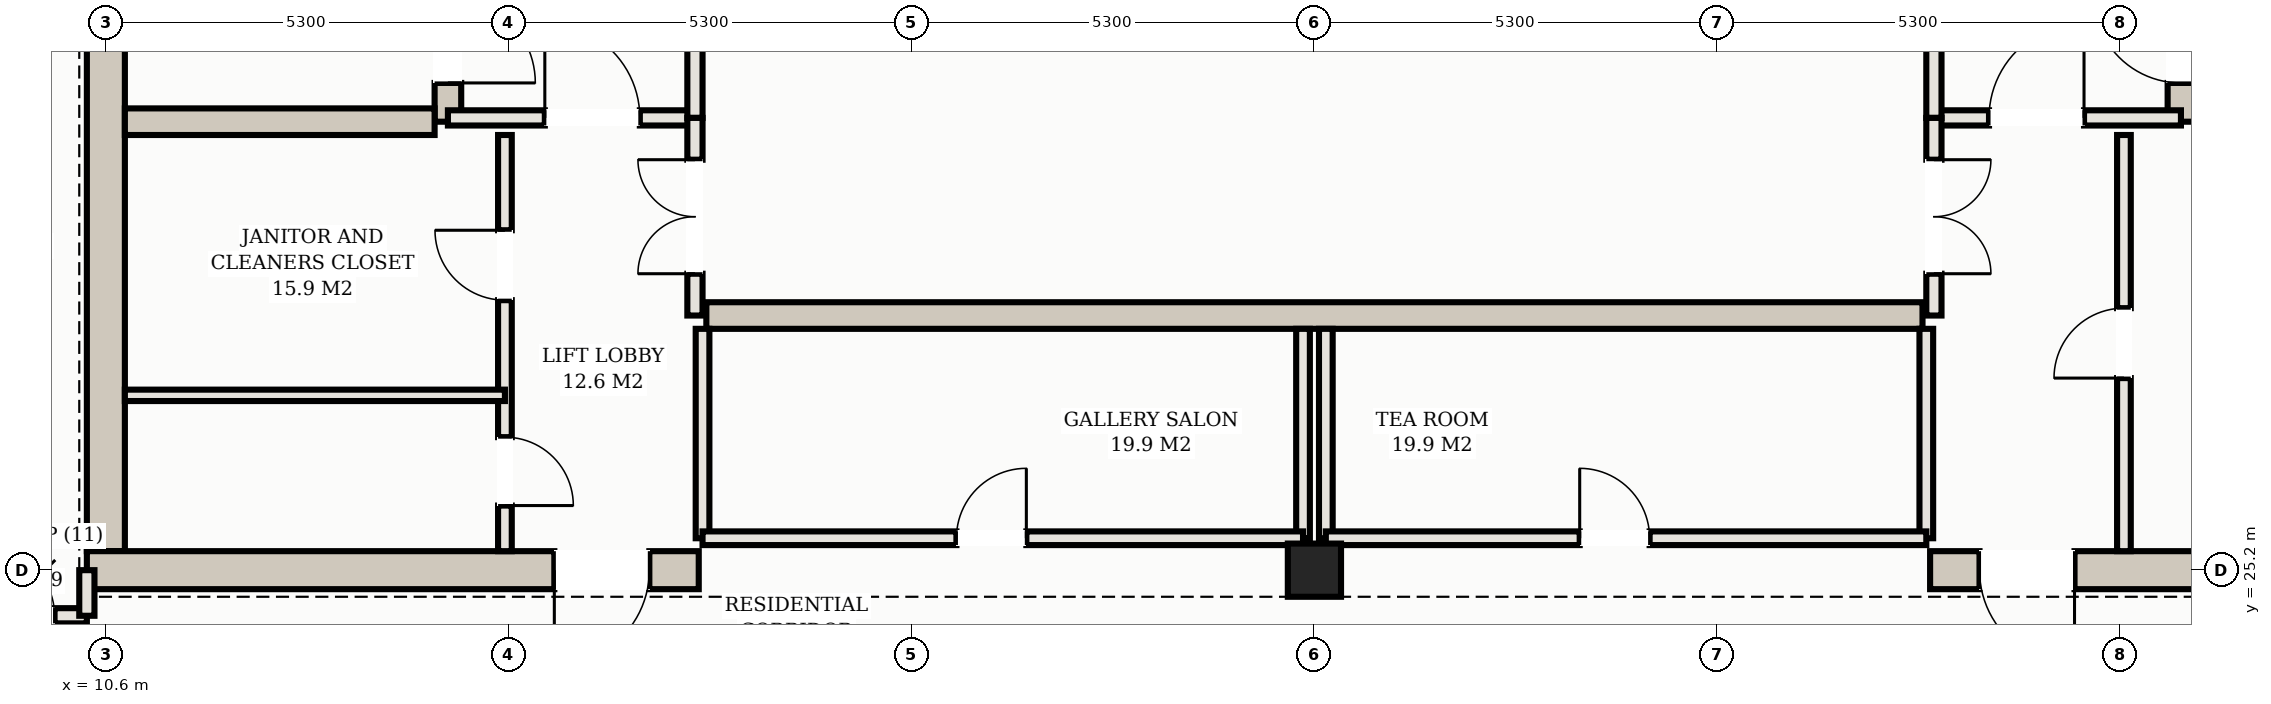
"""IFC4 building model, lengths in metres.
Left out: names, types, materials, properties, quantities, classifications, styles, units other than length and angle.
Written with IfcOpenShell. Run it as: python <this file> out.ifc"""

import sys

from ifc_helpers import new_model, si_unit, direction, frame, frame_2d, origin, origin_2d, place, context, subcontext, project, spatial, rectangle, hollow_rectangle, extrude, element, fill, save


model = new_model("IFC4")
c1 = context("Model", 3, precision=1e-05, world=origin(), true_north=direction((0.0, 1.0)))
c2 = subcontext(c1, "Body", "Model", "MODEL_VIEW")
j1 = project(units=[si_unit("LENGTHUNIT", "METRE"), si_unit("PLANEANGLEUNIT", "RADIAN")], contexts=[c1])
p1 = place(None, origin())
s1 = spatial("IfcSite", under=j1, at=p1, CompositionType="ELEMENT")
p2 = place(p1, origin())
s2 = spatial("IfcBuilding", under=s1, at=p2, CompositionType="ELEMENT")
p3 = place(p2, frame((0.0, 0.0, 246.2)))
s3 = spatial("IfcBuildingStorey", under=s2, at=p3, CompositionType="ELEMENT", Elevation=246.2)
p4 = place(p3, frame((10.6, 25.45, 0.0), z_axis=(0.0, 0.0, 1.0), x_axis=(0.0, 1.0, 0.0)))
e1 = element("IfcWall", 1, at=p4, inside=s3, PredefinedType="SHEAR", context=c2, shape_type="SweptSolid", body=[
    extrude(rectangle(XDim=14.3, YDim=0.5, at=frame_2d((7.15, 0.0))), origin(), (0.0, 0.0, 1.0), 3.11),
])
p5 = place(p3, frame((10.35, 25.2, 0.0), z_axis=(0.0, 0.0, 1.0), x_axis=(1.0, 0.0, 0.0)))
e2 = element("IfcWall", 2, at=p5, inside=s3, PredefinedType="SHEAR", context=c2, shape_type="SweptSolid", body=[
    extrude(rectangle(XDim=8.05, YDim=0.5, at=frame_2d((4.025, 0.0))), origin(), (0.0, 0.0, 1.0), 3.11),
])
p6 = place(p5, frame((6.15, 0.0, 0.0)))
e3 = element("IfcOpeningElement", 3, at=p6, cuts=e2, PredefinedType="OPENING", context=c2, shape_type="SweptSolid", body=[
    extrude(rectangle(XDim=1.25, YDim=2.2, at=frame_2d((0.625, 1.1))), frame((0.0, 0.26, 0.0), z_axis=(0.0, -1.0, 0.0), x_axis=(1.0, 0.0, 0.0)), (0.0, 0.0, 1.0), 0.52),
])
p7 = place(p3, frame((34.6, 25.2, 0.0), z_axis=(0.0, 0.0, 1.0), x_axis=(1.0, 0.0, 0.0)))
e4 = element("IfcWall", 4, at=p7, inside=s3, PredefinedType="SHEAR", context=c2, shape_type="SweptSolid", body=[
    extrude(rectangle(XDim=8.05, YDim=0.5, at=frame_2d((4.025, 0.0))), origin(), (0.0, 0.0, 1.0), 3.11),
])
p8 = place(p7, frame((0.65, 0.0, 0.0)))
e5 = element("IfcOpeningElement", 5, at=p8, cuts=e4, PredefinedType="OPENING", context=c2, shape_type="SweptSolid", body=[
    extrude(rectangle(XDim=1.25, YDim=2.2, at=frame_2d((0.625, 1.1))), frame((0.0, 0.26, 0.0), z_axis=(0.0, -1.0, 0.0), x_axis=(1.0, 0.0, 0.0)), (0.0, 0.0, 1.0), 0.52),
])
p9 = place(p3, frame((15.1, 31.1, 0.0), z_axis=(0.0, 0.0, 1.0), x_axis=(0.0, 1.0, 0.0)))
e6 = element("IfcWall", 6, at=p9, inside=s3, PredefinedType="SHEAR", context=c2, shape_type="SweptSolid", body=[
    extrude(rectangle(XDim=8.65, YDim=0.35, at=frame_2d((4.325, 0.0))), origin(), (0.0, 0.0, 1.0), 3.11),
])
p10 = place(p9, frame((0.51, 0.0, 0.0)))
e7 = element("IfcOpeningElement", 7, at=p10, cuts=e6, PredefinedType="OPENING", context=c2, shape_type="SweptSolid", body=[
    extrude(rectangle(XDim=1.15, YDim=2.2, at=frame_2d((0.575, 1.1))), frame((0.0, 0.185, 0.0), z_axis=(0.0, -1.0, 0.0), x_axis=(1.0, 0.0, 0.0)), (0.0, 0.0, 1.0), 0.37),
])
p11 = place(p3, frame((10.85, 31.1, 0.0), z_axis=(0.0, 0.0, 1.0), x_axis=(1.0, 0.0, 0.0)))
e8 = element("IfcWall", 8, at=p11, inside=s3, PredefinedType="SHEAR", context=c2, shape_type="SweptSolid", body=[
    extrude(rectangle(XDim=4.075, YDim=0.35, at=frame_2d((2.038, 0.0))), origin(), (0.0, 0.0, 1.0), 3.11),
])
p12 = place(p3, frame((37.9, 31.1, 0.0), z_axis=(0.0, 0.0, 1.0), x_axis=(0.0, 1.0, 0.0)))
e9 = element("IfcWall", 9, at=p12, inside=s3, PredefinedType="SHEAR", context=c2, shape_type="SweptSolid", body=[
    extrude(rectangle(XDim=8.65, YDim=0.35, at=frame_2d((4.325, 0.0))), origin(), (0.0, 0.0, 1.0), 3.11),
])
p13 = place(p12, frame((0.51, 0.0, 0.0)))
e10 = element("IfcOpeningElement", 10, at=p13, cuts=e9, PredefinedType="OPENING", context=c2, shape_type="SweptSolid", body=[
    extrude(rectangle(XDim=1.15, YDim=2.2, at=frame_2d((0.575, 1.1))), frame((0.0, 0.185, 0.0), z_axis=(0.0, -1.0, 0.0), x_axis=(1.0, 0.0, 0.0)), (0.0, 0.0, 1.0), 0.37),
])
p14 = place(p3, frame((18.5, 28.55, 0.0), z_axis=(0.0, 0.0, 1.0), x_axis=(1.0, 0.0, 0.0)))
e11 = element("IfcWall", 11, at=p14, inside=s3, PredefinedType="SHEAR", context=c2, shape_type="SweptSolid", body=[
    extrude(rectangle(XDim=16.0, YDim=0.35, at=frame_2d((8.0, 0.0))), origin(), (0.0, 0.0, 1.0), 3.11),
])
p15 = place(p3, frame((26.5, 25.2, 0.0), z_axis=(0.0, 0.0, 1.0), x_axis=(1.0, 0.0, 0.0)))
e12 = element("IfcColumn", 12, at=p15, inside=s3, PredefinedType="COLUMN", context=c2, shape_type="SweptSolid", body=[
    extrude(hollow_rectangle(XDim=0.7, YDim=0.7, WallThickness=0.025, at=origin_2d()), origin(), (0.0, 0.0, 1.0), 3.3),
])
p16 = place(p3, frame((15.1, 31.15, 0.0), z_axis=(0.0, 0.0, 1.0), x_axis=(1.0, 0.0, 0.0)))
e13 = element("IfcWall", 13, at=p16, inside=s3, PredefinedType="PARTITIONING", context=c2, shape_type="SweptSolid", body=[
    extrude(rectangle(XDim=3.25, YDim=0.2, at=frame_2d((1.625, 0.0))), origin(), (0.0, 0.0, 1.0), 2.45),
])
p17 = place(p16, frame((1.275, 0.0, 0.0)))
e14 = element("IfcOpeningElement", 14, at=p17, cuts=e13, PredefinedType="OPENING", context=c2, shape_type="SweptSolid", body=[
    extrude(rectangle(XDim=1.25, YDim=2.2, at=frame_2d((0.625, 1.1))), frame((0.0, 0.11, 0.0), z_axis=(0.0, -1.0, 0.0), x_axis=(1.0, 0.0, 0.0)), (0.0, 0.0, 1.0), 0.22),
])
p18 = place(p3, frame((18.35, 31.15, 0.0), z_axis=(0.0, 0.0, 1.0), x_axis=(0.0, 1.0, 0.0)))
e15 = element("IfcWall", 15, at=p18, inside=s3, PredefinedType="PARTITIONING", context=c2, shape_type="SweptSolid", body=[
    extrude(rectangle(XDim=5.15, YDim=0.2, at=frame_2d((2.575, 0.0))), origin(), (0.0, 0.0, 1.0), 2.45),
])
p19 = place(p18, frame((1.875, 0.0, 0.0)))
e16 = element("IfcOpeningElement", 16, at=p19, cuts=e15, PredefinedType="OPENING", context=c2, shape_type="SweptSolid", body=[
    extrude(rectangle(XDim=1.25, YDim=2.2, at=frame_2d((0.625, 1.1))), frame((0.0, 0.11, 0.0), z_axis=(0.0, -1.0, 0.0), x_axis=(1.0, 0.0, 0.0)), (0.0, 0.0, 1.0), 0.22),
])
p20 = place(p3, frame((34.65, 31.15, 0.0), z_axis=(0.0, 0.0, 1.0), x_axis=(1.0, 0.0, 0.0)))
e17 = element("IfcWall", 17, at=p20, inside=s3, PredefinedType="PARTITIONING", context=c2, shape_type="SweptSolid", body=[
    extrude(rectangle(XDim=3.25, YDim=0.2, at=frame_2d((1.625, 0.0))), origin(), (0.0, 0.0, 1.0), 2.45),
])
p21 = place(p20, frame((0.725, 0.0, 0.0)))
e18 = element("IfcOpeningElement", 18, at=p21, cuts=e17, PredefinedType="OPENING", context=c2, shape_type="SweptSolid", body=[
    extrude(rectangle(XDim=1.25, YDim=2.2, at=frame_2d((0.625, 1.1))), frame((0.0, 0.11, 0.0), z_axis=(0.0, -1.0, 0.0), x_axis=(1.0, 0.0, 0.0)), (0.0, 0.0, 1.0), 0.22),
])
p22 = place(p3, frame((34.65, 31.15, 0.0), z_axis=(0.0, 0.0, 1.0), x_axis=(0.0, 1.0, 0.0)))
e19 = element("IfcWall", 19, at=p22, inside=s3, PredefinedType="PARTITIONING", context=c2, shape_type="SweptSolid", body=[
    extrude(rectangle(XDim=5.15, YDim=0.2, at=frame_2d((2.575, 0.0))), origin(), (0.0, 0.0, 1.0), 2.45),
])
p23 = place(p22, frame((1.875, 0.0, 0.0)))
e20 = element("IfcOpeningElement", 20, at=p23, cuts=e19, PredefinedType="OPENING", context=c2, shape_type="SweptSolid", body=[
    extrude(rectangle(XDim=1.25, YDim=2.2, at=frame_2d((0.625, 1.1))), frame((0.0, 0.11, 0.0), z_axis=(0.0, -1.0, 0.0), x_axis=(1.0, 0.0, 0.0)), (0.0, 0.0, 1.0), 0.22),
])
p24 = place(p3, frame((15.85, 25.45, 0.0), z_axis=(0.0, 0.0, 1.0), x_axis=(0.0, 1.0, 0.0)))
e21 = element("IfcWall", 21, at=p24, inside=s3, PredefinedType="PARTITIONING", context=c2, shape_type="SweptSolid", body=[
    extrude(rectangle(XDim=5.475, YDim=0.18, at=frame_2d((2.738, 0.0))), origin(), (0.0, 0.0, 1.0), 2.45),
])
p25 = place(p24, frame((0.6, 0.0, 0.0)))
e22 = element("IfcOpeningElement", 22, at=p25, cuts=e21, PredefinedType="OPENING", context=c2, shape_type="SweptSolid", body=[
    extrude(rectangle(XDim=0.9, YDim=2.15, at=frame_2d((0.45, 1.075))), frame((0.0, 0.1, 0.0), z_axis=(0.0, -1.0, 0.0), x_axis=(1.0, 0.0, 0.0)), (0.0, 0.0, 1.0), 0.2),
])
p26 = place(p24, frame((3.302, 0.0, 0.0)))
e23 = element("IfcOpeningElement", 23, at=p26, cuts=e21, PredefinedType="OPENING", context=c2, shape_type="SweptSolid", body=[
    extrude(rectangle(XDim=0.92, YDim=2.15, at=frame_2d((0.46, 1.075))), frame((0.0, 0.1, 0.0), z_axis=(0.0, -1.0, 0.0), x_axis=(1.0, 0.0, 0.0)), (0.0, 0.0, 1.0), 0.2),
])
p27 = place(p3, frame((37.15, 25.45, 0.0), z_axis=(0.0, 0.0, 1.0), x_axis=(0.0, 1.0, 0.0)))
e24 = element("IfcWall", 24, at=p27, inside=s3, PredefinedType="PARTITIONING", context=c2, shape_type="SweptSolid", body=[
    extrude(rectangle(XDim=5.475, YDim=0.18, at=frame_2d((2.738, 0.0))), origin(), (0.0, 0.0, 1.0), 2.45),
])
p28 = place(p27, frame((2.277, 0.0, 0.0)))
e25 = element("IfcOpeningElement", 25, at=p28, cuts=e24, PredefinedType="OPENING", context=c2, shape_type="SweptSolid", body=[
    extrude(rectangle(XDim=0.92, YDim=2.15, at=frame_2d((0.46, 1.075))), frame((0.0, 0.1, 0.0), z_axis=(0.0, -1.0, 0.0), x_axis=(1.0, 0.0, 0.0)), (0.0, 0.0, 1.0), 0.2),
])
p29 = place(p3, frame((10.85, 27.5, 0.0), z_axis=(0.0, 0.0, 1.0), x_axis=(1.0, 0.0, 0.0)))
e26 = element("IfcWall", 26, at=p29, inside=s3, PredefinedType="PARTITIONING", context=c2, shape_type="SweptSolid", body=[
    extrude(rectangle(XDim=5.0, YDim=0.15, at=frame_2d((2.5, 0.0))), origin(), (0.0, 0.0, 1.0), 2.45),
])
p30 = place(p3, frame((18.35, 28.55, 0.0), z_axis=(0.0, 0.0, 1.0), x_axis=(0.0, 1.0, 0.0)))
e27 = element("IfcWall", 27, at=p30, inside=s3, PredefinedType="PARTITIONING", context=c2, shape_type="SweptSolid", body=[
    extrude(rectangle(XDim=2.6, YDim=0.2, at=frame_2d((1.3, 0.0))), origin(), (0.0, 0.0, 1.0), 2.45),
])
p31 = place(p30, frame((0.55, 0.0, 0.0)))
e28 = element("IfcOpeningElement", 28, at=p31, cuts=e27, PredefinedType="OPENING", context=c2, shape_type="SweptSolid", body=[
    extrude(rectangle(XDim=1.5, YDim=2.25, at=frame_2d((0.75, 1.125))), frame((0.0, 0.11, 0.0), z_axis=(0.0, -1.0, 0.0), x_axis=(1.0, 0.0, 0.0)), (0.0, 0.0, 1.0), 0.22),
])
p32 = place(p3, frame((34.65, 28.55, 0.0), z_axis=(0.0, 0.0, 1.0), x_axis=(0.0, 1.0, 0.0)))
e29 = element("IfcWall", 29, at=p32, inside=s3, PredefinedType="PARTITIONING", context=c2, shape_type="SweptSolid", body=[
    extrude(rectangle(XDim=2.6, YDim=0.2, at=frame_2d((1.3, 0.0))), origin(), (0.0, 0.0, 1.0), 2.45),
])
p33 = place(p32, frame((0.55, 0.0, 0.0)))
e30 = element("IfcOpeningElement", 30, at=p33, cuts=e29, PredefinedType="OPENING", context=c2, shape_type="SweptSolid", body=[
    extrude(rectangle(XDim=1.5, YDim=2.25, at=frame_2d((0.75, 1.125))), frame((0.0, 0.11, 0.0), z_axis=(0.0, -1.0, 0.0), x_axis=(1.0, 0.0, 0.0)), (0.0, 0.0, 1.0), 0.22),
])
for number, where, z_axis, x_axis in (
    (31, (18.45, 25.62, 0.0), (0.0, 0.0, 1.0), (0.0, 1.0, 0.0)),
    (32, (26.35, 25.62, 0.0), (0.0, 0.0, 1.0), (0.0, 1.0, 0.0)),
):
    element("IfcWall", number, at=place(p3, frame(where, z_axis=z_axis, x_axis=x_axis)), inside=s3, PredefinedType="PARTITIONING", context=c2, shape_type="SweptSolid", body=[
        extrude(rectangle(XDim=2.755, YDim=0.18, at=frame_2d((1.377, 0.0))), origin(), (0.0, 0.0, 1.0), 2.45),
    ])
p34 = place(p3, frame((18.45, 25.62, 0.0), z_axis=(0.0, 0.0, 1.0), x_axis=(1.0, 0.0, 0.0)))
e33 = element("IfcWall", 33, at=p34, inside=s3, PredefinedType="PARTITIONING", context=c2, shape_type="SweptSolid", body=[
    extrude(rectangle(XDim=7.9, YDim=0.18, at=frame_2d((3.95, 0.0))), origin(), (0.0, 0.0, 1.0), 2.45),
])
p35 = place(p34, frame((3.34, 0.0, 0.0)))
e34 = element("IfcOpeningElement", 34, at=p35, cuts=e33, PredefinedType="OPENING", context=c2, shape_type="SweptSolid", body=[
    extrude(rectangle(XDim=0.92, YDim=2.15, at=frame_2d((0.46, 1.075))), frame((0.0, 0.1, 0.0), z_axis=(0.0, -1.0, 0.0), x_axis=(1.0, 0.0, 0.0)), (0.0, 0.0, 1.0), 0.2),
])
for number, where, z_axis, x_axis in (
    (35, (26.65, 25.62, 0.0), (0.0, 0.0, 1.0), (0.0, 1.0, 0.0)),
    (36, (34.55, 25.62, 0.0), (0.0, 0.0, 1.0), (0.0, 1.0, 0.0)),
):
    element("IfcWall", number, at=place(p3, frame(where, z_axis=z_axis, x_axis=x_axis)), inside=s3, PredefinedType="PARTITIONING", context=c2, shape_type="SweptSolid", body=[
        extrude(rectangle(XDim=2.755, YDim=0.18, at=frame_2d((1.377, 0.0))), origin(), (0.0, 0.0, 1.0), 2.45),
    ])
p36 = place(p3, frame((26.65, 25.62, 0.0), z_axis=(0.0, 0.0, 1.0), x_axis=(1.0, 0.0, 0.0)))
e37 = element("IfcWall", 37, at=p36, inside=s3, PredefinedType="PARTITIONING", context=c2, shape_type="SweptSolid", body=[
    extrude(rectangle(XDim=7.9, YDim=0.18, at=frame_2d((3.95, 0.0))), origin(), (0.0, 0.0, 1.0), 2.45),
])
p37 = place(p36, frame((3.34, 0.0, 0.0)))
e38 = element("IfcOpeningElement", 38, at=p37, cuts=e37, PredefinedType="OPENING", context=c2, shape_type="SweptSolid", body=[
    extrude(rectangle(XDim=0.92, YDim=2.15, at=frame_2d((0.46, 1.075))), frame((0.0, 0.1, 0.0), z_axis=(0.0, -1.0, 0.0), x_axis=(1.0, 0.0, 0.0)), (0.0, 0.0, 1.0), 0.2),
])
p38 = place(p3, frame((8.6, 24.6, 0.0), z_axis=(0.0, 0.0, 1.0), x_axis=(1.0, 0.0, 0.0)))
e39 = element("IfcWall", 39, at=p38, inside=s3, PredefinedType="PARTITIONING", context=c2, shape_type="SweptSolid", body=[
    extrude(rectangle(XDim=1.75, YDim=0.2, at=frame_2d((0.875, 0.0))), origin(), (0.0, 0.0, 1.0), 2.45),
])
p39 = place(p38, frame((0.425, 0.0, 0.0)))
e40 = element("IfcOpeningElement", 40, at=p39, cuts=e39, PredefinedType="OPENING", context=c2, shape_type="SweptSolid", body=[
    extrude(rectangle(XDim=0.9, YDim=2.15, at=frame_2d((0.45, 1.075))), frame((0.0, 0.11, 0.0), z_axis=(0.0, -1.0, 0.0), x_axis=(1.0, 0.0, 0.0)), (0.0, 0.0, 1.0), 0.22),
])
p40 = place(p3, frame((10.35, 24.6, 0.0), z_axis=(0.0, 0.0, 1.0), x_axis=(0.0, 1.0, 0.0)))
e41 = element("IfcWall", 41, at=p40, inside=s3, PredefinedType="PARTITIONING", context=c2, shape_type="SweptSolid", body=[
    extrude(rectangle(XDim=0.6, YDim=0.2, at=frame_2d((0.3, 0.0))), origin(), (0.0, 0.0, 1.0), 2.45),
])
p41 = place(p6, frame((1.25, 0.0, 0.0), z_axis=(0.0, 0.0, 1.0), x_axis=(-1.0, 0.0, 0.0)))
e42 = element("IfcDoor", 42, at=p41, inside=s3, OperationType="SINGLE_SWING_RIGHT", PredefinedType="DOOR", context=c2, shape_type="SweptSolid", body=[
    extrude(rectangle(XDim=1.25, YDim=2.2, at=frame_2d((0.625, 1.1))), frame((0.0, 0.025, 0.0), z_axis=(0.0, -1.0, 0.0), x_axis=(1.0, 0.0, 0.0)), (0.0, 0.0, 1.0), 0.05),
])
fill(e3, e42)
p42 = place(p8, frame((1.25, 0.0, 0.0), z_axis=(0.0, 0.0, 1.0), x_axis=(-1.0, 0.0, 0.0)))
e43 = element("IfcDoor", 43, at=p42, inside=s3, OperationType="SINGLE_SWING_LEFT", PredefinedType="DOOR", context=c2, shape_type="SweptSolid", body=[
    extrude(rectangle(XDim=1.25, YDim=2.2, at=frame_2d((0.625, 1.1))), frame((0.0, 0.025, 0.0), z_axis=(0.0, -1.0, 0.0), x_axis=(1.0, 0.0, 0.0)), (0.0, 0.0, 1.0), 0.05),
])
fill(e5, e43)
p43 = place(p17, origin())
e44 = element("IfcDoor", 44, at=p43, inside=s3, OperationType="SINGLE_SWING_LEFT", PredefinedType="DOOR", context=c2, shape_type="SweptSolid", body=[
    extrude(rectangle(XDim=1.25, YDim=2.2, at=frame_2d((0.625, 1.1))), frame((0.0, 0.025, 0.0), z_axis=(0.0, -1.0, 0.0), x_axis=(1.0, 0.0, 0.0)), (0.0, 0.0, 1.0), 0.05),
])
fill(e14, e44)
p44 = place(p21, origin())
e45 = element("IfcDoor", 45, at=p44, inside=s3, OperationType="SINGLE_SWING_RIGHT", PredefinedType="DOOR", context=c2, shape_type="SweptSolid", body=[
    extrude(rectangle(XDim=1.25, YDim=2.2, at=frame_2d((0.625, 1.1))), frame((0.0, 0.025, 0.0), z_axis=(0.0, -1.0, 0.0), x_axis=(1.0, 0.0, 0.0)), (0.0, 0.0, 1.0), 0.05),
])
fill(e18, e45)
p45 = place(p10, frame((1.15, 0.0, 0.0), z_axis=(0.0, 0.0, 1.0), x_axis=(-1.0, 0.0, 0.0)))
e46 = element("IfcDoor", 46, at=p45, inside=s3, OperationType="SINGLE_SWING_RIGHT", PredefinedType="DOOR", context=c2, shape_type="SweptSolid", body=[
    extrude(rectangle(XDim=1.15, YDim=2.2, at=frame_2d((0.575, 1.1))), frame((0.0, 0.025, 0.0), z_axis=(0.0, -1.0, 0.0), x_axis=(1.0, 0.0, 0.0)), (0.0, 0.0, 1.0), 0.05),
])
fill(e7, e46)
p46 = place(p13, origin())
e47 = element("IfcDoor", 47, at=p46, inside=s3, OperationType="SINGLE_SWING_RIGHT", PredefinedType="DOOR", context=c2, shape_type="SweptSolid", body=[
    extrude(rectangle(XDim=1.15, YDim=2.2, at=frame_2d((0.575, 1.1))), frame((0.0, 0.025, 0.0), z_axis=(0.0, -1.0, 0.0), x_axis=(1.0, 0.0, 0.0)), (0.0, 0.0, 1.0), 0.05),
])
fill(e10, e47)
p47 = place(p25, frame((0.9, 0.0, 0.0), z_axis=(0.0, 0.0, 1.0), x_axis=(-1.0, 0.0, 0.0)))
e48 = element("IfcDoor", 48, at=p47, inside=s3, OperationType="SINGLE_SWING_RIGHT", PredefinedType="DOOR", context=c2, shape_type="SweptSolid", body=[
    extrude(rectangle(XDim=0.9, YDim=2.15, at=frame_2d((0.45, 1.075))), frame((0.0, 0.025, 0.0), z_axis=(0.0, -1.0, 0.0), x_axis=(1.0, 0.0, 0.0)), (0.0, 0.0, 1.0), 0.05),
])
fill(e22, e48)
p48 = place(p26, origin())
e49 = element("IfcDoor", 49, at=p48, inside=s3, OperationType="SINGLE_SWING_RIGHT", PredefinedType="DOOR", context=c2, shape_type="SweptSolid", body=[
    extrude(rectangle(XDim=0.92, YDim=2.15, at=frame_2d((0.46, 1.075))), frame((0.0, 0.025, 0.0), z_axis=(0.0, -1.0, 0.0), x_axis=(1.0, 0.0, 0.0)), (0.0, 0.0, 1.0), 0.05),
])
fill(e23, e49)
p49 = place(p28, origin())
e50 = element("IfcDoor", 50, at=p49, inside=s3, OperationType="SINGLE_SWING_LEFT", PredefinedType="DOOR", context=c2, shape_type="SweptSolid", body=[
    extrude(rectangle(XDim=0.92, YDim=2.15, at=frame_2d((0.46, 1.075))), frame((0.0, 0.025, 0.0), z_axis=(0.0, -1.0, 0.0), x_axis=(1.0, 0.0, 0.0)), (0.0, 0.0, 1.0), 0.05),
])
fill(e25, e50)
p50 = place(p31, origin())
e51 = element("IfcDoor", 51, at=p50, inside=s3, OperationType="DOUBLE_DOOR_SINGLE_SWING", PredefinedType="DOOR", context=c2, shape_type="SweptSolid", body=[
    extrude(rectangle(XDim=1.5, YDim=2.25, at=frame_2d((0.75, 1.125))), frame((0.0, 0.025, 0.0), z_axis=(0.0, -1.0, 0.0), x_axis=(1.0, 0.0, 0.0)), (0.0, 0.0, 1.0), 0.05),
])
fill(e28, e51)
p51 = place(p33, frame((1.5, 0.0, 0.0), z_axis=(0.0, 0.0, 1.0), x_axis=(-1.0, 0.0, 0.0)))
e52 = element("IfcDoor", 52, at=p51, inside=s3, OperationType="DOUBLE_DOOR_SINGLE_SWING", PredefinedType="DOOR", context=c2, shape_type="SweptSolid", body=[
    extrude(rectangle(XDim=1.5, YDim=2.25, at=frame_2d((0.75, 1.125))), frame((0.0, 0.025, 0.0), z_axis=(0.0, -1.0, 0.0), x_axis=(1.0, 0.0, 0.0)), (0.0, 0.0, 1.0), 0.05),
])
fill(e30, e52)
p52 = place(p35, origin())
e53 = element("IfcDoor", 53, at=p52, inside=s3, OperationType="SINGLE_SWING_RIGHT", PredefinedType="DOOR", context=c2, shape_type="SweptSolid", body=[
    extrude(rectangle(XDim=0.92, YDim=2.15, at=frame_2d((0.46, 1.075))), frame((0.0, 0.025, 0.0), z_axis=(0.0, -1.0, 0.0), x_axis=(1.0, 0.0, 0.0)), (0.0, 0.0, 1.0), 0.05),
])
fill(e34, e53)
p53 = place(p37, origin())
e54 = element("IfcDoor", 54, at=p53, inside=s3, OperationType="SINGLE_SWING_LEFT", PredefinedType="DOOR", context=c2, shape_type="SweptSolid", body=[
    extrude(rectangle(XDim=0.92, YDim=2.15, at=frame_2d((0.46, 1.075))), frame((0.0, 0.025, 0.0), z_axis=(0.0, -1.0, 0.0), x_axis=(1.0, 0.0, 0.0)), (0.0, 0.0, 1.0), 0.05),
])
fill(e38, e54)
p54 = place(p39, origin())
e55 = element("IfcDoor", 55, at=p54, inside=s3, OperationType="SINGLE_SWING_LEFT", PredefinedType="DOOR", context=c2, shape_type="SweptSolid", body=[
    extrude(rectangle(XDim=0.9, YDim=2.15, at=frame_2d((0.45, 1.075))), frame((0.0, 0.025, 0.0), z_axis=(0.0, -1.0, 0.0), x_axis=(1.0, 0.0, 0.0)), (0.0, 0.0, 1.0), 0.05),
])
fill(e40, e55)
save(model, sys.argv[1])
